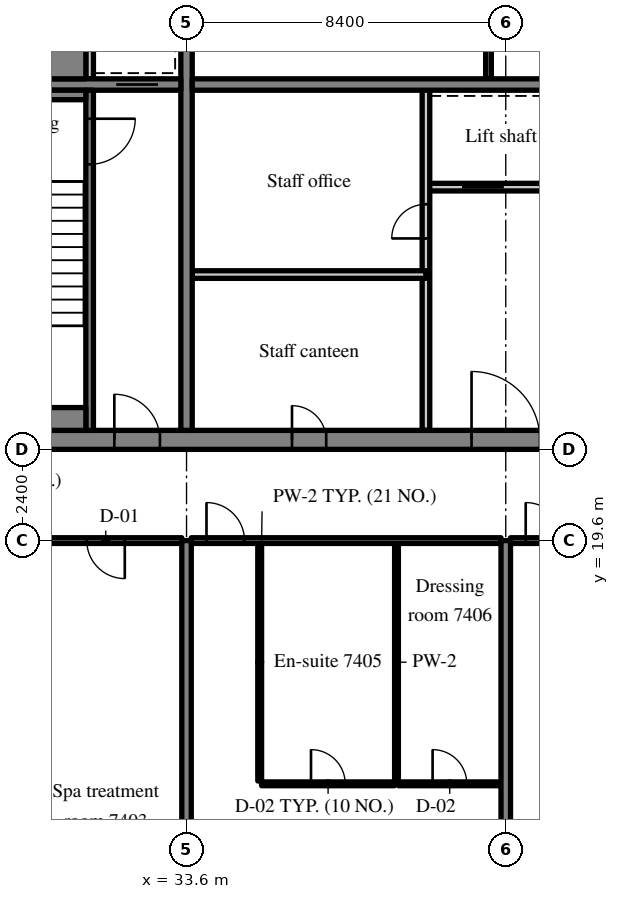
"""IFC4 building model, lengths in metres.
Left out: names, types, materials, properties, quantities, classifications, styles, units other than length and angle.
Written with IfcOpenShell. Run it as: python <this file> out.ifc"""

import sys

from ifc_helpers import new_model, si_unit, direction, frame, frame_2d, origin, place, context, subcontext, project, spatial, rectangle, extrude, source, transform, mapped, element, fill, save


model = new_model("IFC4")
c1 = context("Model", 3, precision=1e-05, world=origin(), true_north=direction((0.0, 1.0)))
c2 = subcontext(c1, "Body", "Model", "MODEL_VIEW")
j1 = project(units=[si_unit("LENGTHUNIT", "METRE"), si_unit("PLANEANGLEUNIT", "RADIAN")], contexts=[c1])
p1 = place(None, origin())
s1 = spatial("IfcSite", under=j1, at=p1, CompositionType="ELEMENT")
p2 = place(p1, origin())
s2 = spatial("IfcBuilding", under=s1, at=p2, CompositionType="ELEMENT")
p3 = place(p2, frame((0.0, 0.0, 309.7)))
s3 = spatial("IfcBuildingStorey", under=s2, at=p3, CompositionType="ELEMENT", Elevation=309.7)
m1 = source(origin(), c2, "Body", "SweptSolid", [
    extrude(rectangle(XDim=50.4, YDim=0.5, at=frame_2d((25.2, 0.0))), origin(), (0.0, 0.0, 1.0), 3.72),
])
p4 = place(p3, frame((25.2, 22.25, 0.0), z_axis=(0.0, 0.0, 1.0), x_axis=(1.0, 0.0, 0.0)))
e1 = element("IfcWall", 1, at=p4, inside=s3, PredefinedType="SHEAR", context=c2, shape_type="MappedRepresentation", body=[
    mapped(m1, transform((0.0, 0.0, 0.0), scale=1.0)),
])
m2 = source(origin(), c2, "Body", "SweptSolid", [
    extrude(rectangle(XDim=1.8, YDim=2.1, at=frame_2d((0.9, 1.05))), frame((0.0, 0.26, 0.0), z_axis=(0.0, -1.0, 0.0), x_axis=(1.0, 0.0, 0.0)), (0.0, 0.0, 1.0), 0.52),
])
p5 = place(p4, frame((15.9, 0.0, 0.0)))
e2 = element("IfcOpeningElement", 2, at=p5, cuts=e1, PredefinedType="OPENING", context=c2, shape_type="MappedRepresentation", body=[
    mapped(m2, transform((0.0, 0.0, 0.0), scale=1.0)),
])
m3 = source(origin(), c2, "Body", "SweptSolid", [
    extrude(rectangle(XDim=0.9, YDim=2.1, at=frame_2d((0.45, 1.05))), frame((0.0, 0.26, 0.0), z_axis=(0.0, -1.0, 0.0), x_axis=(1.0, 0.0, 0.0)), (0.0, 0.0, 1.0), 0.52),
])
p6 = place(p4, frame((11.175, 0.0, 0.0)))
e3 = element("IfcOpeningElement", 3, at=p6, cuts=e1, PredefinedType="OPENING", context=c2, shape_type="MappedRepresentation", body=[
    mapped(m3, transform((0.0, 0.0, 0.0), scale=1.0)),
])
p7 = place(p4, frame((21.525, 0.0, 0.0)))
e4 = element("IfcOpeningElement", 4, at=p7, cuts=e1, PredefinedType="OPENING", context=c2, shape_type="MappedRepresentation", body=[
    mapped(m3, transform((0.0, 0.0, 0.0), scale=1.0)),
])
p8 = place(p4, frame((32.7, 0.0, 0.0)))
e5 = element("IfcOpeningElement", 5, at=p8, cuts=e1, PredefinedType="OPENING", context=c2, shape_type="MappedRepresentation", body=[
    mapped(m2, transform((0.0, 0.0, 0.0), scale=1.0)),
])
m4 = source(origin(), c2, "Body", "SweptSolid", [
    extrude(rectangle(XDim=1.2, YDim=2.1, at=frame_2d((0.6, 1.05))), frame((0.0, 0.26, 0.0), z_axis=(0.0, -1.0, 0.0), x_axis=(1.0, 0.0, 0.0)), (0.0, 0.0, 1.0), 0.52),
])
p9 = place(p4, frame((6.5, 0.0, 0.0)))
e6 = element("IfcOpeningElement", 6, at=p9, cuts=e1, PredefinedType="OPENING", context=c2, shape_type="MappedRepresentation", body=[
    mapped(m4, transform((0.0, 0.0, 0.0), scale=1.0)),
])
p10 = place(p4, frame((47.975, 0.0, 0.0)))
e7 = element("IfcOpeningElement", 7, at=p10, cuts=e1, PredefinedType="OPENING", context=c2, shape_type="MappedRepresentation", body=[
    mapped(m4, transform((0.0, 0.0, 0.0), scale=1.0)),
])
m5 = source(origin(), c2, "Body", "SweptSolid", [
    extrude(rectangle(XDim=19.0, YDim=0.3, at=frame_2d((9.5, 0.0))), origin(), (0.0, 0.0, 1.0), 3.72),
])
p11 = place(p3, frame((33.6, 22.5, 0.0), z_axis=(0.0, 0.0, 1.0), x_axis=(0.0, 1.0, 0.0)))
e8 = element("IfcWall", 8, at=p11, inside=s3, PredefinedType="SHEAR", context=c2, shape_type="MappedRepresentation", body=[
    mapped(m5, transform((0.0, 0.0, 0.0), scale=1.0)),
])
m6 = source(origin(), c2, "Body", "SweptSolid", [
    extrude(rectangle(XDim=1.1, YDim=2.1, at=frame_2d((0.55, 1.05))), frame((0.0, 0.16, 0.0), z_axis=(0.0, -1.0, 0.0), x_axis=(1.0, 0.0, 0.0)), (0.0, 0.0, 1.0), 0.32),
])
p12 = place(p11, frame((12.95, 0.0, 0.0)))
e9 = element("IfcOpeningElement", 9, at=p12, cuts=e8, PredefinedType="OPENING", context=c2, shape_type="MappedRepresentation", body=[
    mapped(m6, transform((0.0, 0.0, 0.0), scale=1.0)),
])
m7 = source(origin(), c2, "Body", "SweptSolid", [
    extrude(rectangle(XDim=7.75, YDim=0.3, at=frame_2d((3.875, 0.0))), origin(), (0.0, 0.0, 1.0), 3.72),
])
p13 = place(p3, frame((25.7, 31.6, 0.0), z_axis=(0.0, 0.0, 1.0), x_axis=(1.0, 0.0, 0.0)))
e10 = element("IfcWall", 10, at=p13, inside=s3, PredefinedType="SHEAR", context=c2, shape_type="MappedRepresentation", body=[
    mapped(m7, transform((0.0, 0.0, 0.0), scale=1.0)),
])
p14 = place(p13, frame((6.05, 0.0, 0.0)))
e11 = element("IfcOpeningElement", 11, at=p14, cuts=e10, PredefinedType="OPENING", context=c2, shape_type="MappedRepresentation", body=[
    mapped(m6, transform((0.0, 0.0, 0.0), scale=1.0)),
])
m8 = source(origin(), c2, "Body", "SweptSolid", [
    extrude(rectangle(XDim=16.5, YDim=0.3, at=frame_2d((8.25, 0.0))), origin(), (0.0, 0.0, 1.0), 3.72),
])
p15 = place(p3, frame((33.75, 31.6, 0.0), z_axis=(0.0, 0.0, 1.0), x_axis=(1.0, 0.0, 0.0)))
e12 = element("IfcWall", 12, at=p15, inside=s3, PredefinedType="SHEAR", context=c2, shape_type="MappedRepresentation", body=[
    mapped(m8, transform((0.0, 0.0, 0.0), scale=1.0)),
])
m9 = source(origin(), c2, "Body", "SweptSolid", [
    extrude(rectangle(XDim=1.0, YDim=2.1, at=frame_2d((0.5, 1.05))), frame((0.0, 0.16, 0.0), z_axis=(0.0, -1.0, 0.0), x_axis=(1.0, 0.0, 0.0)), (0.0, 0.0, 1.0), 0.32),
])
p16 = place(p15, frame((14.875, 0.0, 0.0)))
e13 = element("IfcOpeningElement", 13, at=p16, cuts=e12, PredefinedType="OPENING", context=c2, shape_type="MappedRepresentation", body=[
    mapped(m9, transform((0.0, 0.0, 0.0), scale=1.0)),
])
m10 = source(origin(), c2, "Body", "SweptSolid", [
    extrude(rectangle(XDim=14.1, YDim=0.25, at=frame_2d((7.05, 0.0))), origin(), (0.0, 0.0, 1.0), 3.72),
])
for number, where, z_axis, x_axis in (
    (14, (33.6, 5.5, 0.0), (0.0, 0.0, 1.0), (0.0, 1.0, 0.0)),
    (15, (42.0, 5.5, 0.0), (0.0, 0.0, 1.0), (0.0, 1.0, 0.0)),
):
    element("IfcWall", number, at=place(p3, frame(where, z_axis=z_axis, x_axis=x_axis)), inside=s3, PredefinedType="SHEAR", context=c2, shape_type="MappedRepresentation", body=[
        mapped(m10, transform((0.0, 0.0, 0.0), scale=1.0)),
    ])
m11 = source(origin(), c2, "Body", "SweptSolid", [
    extrude(rectangle(XDim=6.0, YDim=0.2, at=frame_2d((3.0, 0.0))), origin(), (0.0, 0.0, 1.0), 3.72),
])
p17 = place(p3, frame((39.9, 28.9, 0.0), z_axis=(0.0, 0.0, 1.0), x_axis=(1.0, 0.0, 0.0)))
e16 = element("IfcWall", 16, at=p17, inside=s3, PredefinedType="SOLIDWALL", context=c2, shape_type="MappedRepresentation", body=[
    mapped(m11, transform((0.0, 0.0, 0.0), scale=1.0)),
])
m12 = source(origin(), c2, "Body", "SweptSolid", [
    extrude(rectangle(XDim=1.1, YDim=2.1, at=frame_2d((0.55, 1.05))), frame((0.0, 0.11, 0.0), z_axis=(0.0, -1.0, 0.0), x_axis=(1.0, 0.0, 0.0)), (0.0, 0.0, 1.0), 0.22),
])
p18 = place(p17, frame((0.95, 0.0, 0.0)))
e17 = element("IfcOpeningElement", 17, at=p18, cuts=e16, PredefinedType="OPENING", context=c2, shape_type="MappedRepresentation", body=[
    mapped(m12, transform((0.0, 0.0, 0.0), scale=1.0)),
])
p19 = place(p17, frame((3.95, 0.0, 0.0)))
e18 = element("IfcOpeningElement", 18, at=p19, cuts=e16, PredefinedType="OPENING", context=c2, shape_type="MappedRepresentation", body=[
    mapped(m12, transform((0.0, 0.0, 0.0), scale=1.0)),
])
m13 = source(origin(), c2, "Body", "SweptSolid", [
    extrude(rectangle(XDim=8.95, YDim=0.2, at=frame_2d((4.475, 0.0))), origin(), (0.0, 0.0, 1.0), 3.72),
])
p20 = place(p3, frame((39.9, 22.5, 0.0), z_axis=(0.0, 0.0, 1.0), x_axis=(0.0, 1.0, 0.0)))
e19 = element("IfcWall", 19, at=p20, inside=s3, PredefinedType="PARTITIONING", context=c2, shape_type="MappedRepresentation", body=[
    mapped(m13, transform((0.0, 0.0, 0.0), scale=1.0)),
])
m14 = source(origin(), c2, "Body", "SweptSolid", [
    extrude(rectangle(XDim=0.9, YDim=2.1, at=frame_2d((0.45, 1.05))), frame((0.0, 0.11, 0.0), z_axis=(0.0, -1.0, 0.0), x_axis=(1.0, 0.0, 0.0)), (0.0, 0.0, 1.0), 0.22),
])
p21 = place(p20, frame((5.05, 0.0, 0.0)))
e20 = element("IfcOpeningElement", 20, at=p21, cuts=e19, PredefinedType="OPENING", context=c2, shape_type="MappedRepresentation", body=[
    mapped(m14, transform((0.0, 0.0, 0.0), scale=1.0)),
])
m15 = source(origin(), c2, "Body", "SweptSolid", [
    extrude(rectangle(XDim=6.15, YDim=0.2, at=frame_2d((3.075, 0.0))), origin(), (0.0, 0.0, 1.0), 3.72),
])
p22 = place(p3, frame((33.75, 26.6, 0.0), z_axis=(0.0, 0.0, 1.0), x_axis=(1.0, 0.0, 0.0)))
e21 = element("IfcWall", 21, at=p22, inside=s3, PredefinedType="PARTITIONING", context=c2, shape_type="MappedRepresentation", body=[
    mapped(m15, transform((0.0, 0.0, 0.0), scale=1.0)),
])
m16 = source(origin(), c2, "Body", "SweptSolid", [
    extrude(rectangle(XDim=3.25, YDim=0.15, at=frame_2d((1.625, 0.0))), origin(), (0.0, 0.0, 1.0), 3.72),
])
p23 = place(p3, frame((41.546, 31.75, 0.0), z_axis=(0.0, 0.0, 1.0), x_axis=(0.0, 1.0, 0.0)))
e22 = element("IfcWall", 22, at=p23, inside=s3, PredefinedType="PARTITIONING", context=c2, shape_type="MappedRepresentation", body=[
    mapped(m16, transform((0.0, 0.0, 0.0), scale=1.0)),
])
m17 = source(origin(), c2, "Body", "SweptSolid", [
    extrude(rectangle(XDim=8.95, YDim=0.2, at=frame_2d((4.475, 0.0))), origin(), (0.0, 0.0, 1.0), 3.72),
])
p24 = place(p3, frame((31.05, 22.5, 0.0), z_axis=(0.0, 0.0, 1.0), x_axis=(0.0, 1.0, 0.0)))
e23 = element("IfcWall", 23, at=p24, inside=s3, PredefinedType="SOLIDWALL", context=c2, shape_type="MappedRepresentation", body=[
    mapped(m17, transform((0.0, 0.0, 0.0), scale=1.0)),
])
m18 = source(origin(), c2, "Body", "SweptSolid", [
    extrude(rectangle(XDim=1.2, YDim=2.1, at=frame_2d((0.6, 1.05))), frame((0.0, 0.11, 0.0), z_axis=(0.0, -1.0, 0.0), x_axis=(1.0, 0.0, 0.0)), (0.0, 0.0, 1.0), 0.22),
])
p25 = place(p24, frame((7.0, 0.0, 0.0)))
e24 = element("IfcOpeningElement", 24, at=p25, cuts=e23, PredefinedType="OPENING", context=c2, shape_type="MappedRepresentation", body=[
    mapped(m18, transform((0.0, 0.0, 0.0), scale=1.0)),
])
m19 = source(origin(), c2, "Body", "SweptSolid", [
    extrude(rectangle(XDim=1.85, YDim=0.2, at=frame_2d((0.925, 0.0))), origin(), (0.0, 0.0, 1.0), 3.72),
])
p26 = place(p3, frame((31.05, 31.75, 0.0), z_axis=(0.0, 0.0, 1.0), x_axis=(0.0, 1.0, 0.0)))
e25 = element("IfcWall", 25, at=p26, inside=s3, PredefinedType="SOLIDWALL", context=c2, shape_type="MappedRepresentation", body=[
    mapped(m19, transform((0.0, 0.0, 0.0), scale=1.0)),
])
m20 = source(origin(), c2, "Body", "SweptSolid", [
    extrude(rectangle(XDim=5.25, YDim=0.6, at=frame_2d((2.625, 0.0))), origin(), (0.0, 0.0, 1.0), 3.72),
])
p27 = place(p3, frame((25.7, 22.8, 0.0), z_axis=(0.0, 0.0, 1.0), x_axis=(1.0, 0.0, 0.0)))
e26 = element("IfcWall", 26, at=p27, inside=s3, PredefinedType="SOLIDWALL", context=c2, shape_type="MappedRepresentation", body=[
    mapped(m20, transform((0.0, 0.0, 0.0), scale=1.0)),
])
m21 = source(origin(), c2, "Body", "SweptSolid", [
    extrude(rectangle(XDim=5.25, YDim=0.25, at=frame_2d((2.625, 0.0))), origin(), (0.0, 0.0, 1.0), 3.72),
])
p28 = place(p3, frame((25.7, 31.325, 0.0), z_axis=(0.0, 0.0, 1.0), x_axis=(1.0, 0.0, 0.0)))
e27 = element("IfcWall", 27, at=p28, inside=s3, PredefinedType="SOLIDWALL", context=c2, shape_type="MappedRepresentation", body=[
    mapped(m21, transform((0.0, 0.0, 0.0), scale=1.0)),
])
m22 = source(origin(), c2, "Body", "SweptSolid", [
    extrude(rectangle(XDim=5.25, YDim=1.05, at=frame_2d((2.625, 0.0))), origin(), (0.0, 0.0, 1.0), 3.72),
])
p29 = place(p3, frame((25.7, 32.275, 0.0), z_axis=(0.0, 0.0, 1.0), x_axis=(1.0, 0.0, 0.0)))
e28 = element("IfcWall", 28, at=p29, inside=s3, PredefinedType="SOLIDWALL", context=c2, shape_type="MappedRepresentation", body=[
    mapped(m22, transform((0.0, 0.0, 0.0), scale=1.0)),
])
m23 = source(origin(), c2, "Body", "SweptSolid", [
    extrude(rectangle(XDim=4.0, YDim=0.15, at=frame_2d((2.0, 0.0))), origin(), (0.0, 0.0, 1.0), 3.02),
])
p30 = place(p3, frame((29.475, 19.6, 0.0), z_axis=(0.0, 0.0, 1.0), x_axis=(1.0, 0.0, 0.0)))
e29 = element("IfcWall", 29, at=p30, inside=s3, PredefinedType="PARTITIONING", context=c2, shape_type="MappedRepresentation", body=[
    mapped(m23, transform((0.0, 0.0, 0.0), scale=1.0)),
])
m24 = source(origin(), c2, "Body", "SweptSolid", [
    extrude(rectangle(XDim=1.0, YDim=2.1, at=frame_2d((0.5, 1.05))), frame((0.0, 0.085, 0.0), z_axis=(0.0, -1.0, 0.0), x_axis=(1.0, 0.0, 0.0)), (0.0, 0.0, 1.0), 0.17),
])
p31 = place(p30, frame((1.5, 0.0, 0.0)))
e30 = element("IfcOpeningElement", 30, at=p31, cuts=e29, PredefinedType="OPENING", context=c2, shape_type="MappedRepresentation", body=[
    mapped(m24, transform((0.0, 0.0, 0.0), scale=1.0)),
])
m25 = source(origin(), c2, "Body", "SweptSolid", [
    extrude(rectangle(XDim=6.25, YDim=0.1, at=frame_2d((3.125, 0.0))), origin(), (0.0, 0.0, 1.0), 3.72),
])
for number, where, z_axis, x_axis in (
    (31, (35.525, 13.275, 0.0), (0.0, 0.0, 1.0), (0.0, 1.0, 0.0)),
    (32, (39.125, 13.275, 0.0), (0.0, 0.0, 1.0), (0.0, 1.0, 0.0)),
):
    element("IfcWall", number, at=place(p3, frame(where, z_axis=z_axis, x_axis=x_axis)), inside=s3, PredefinedType="PARTITIONING", context=c2, shape_type="MappedRepresentation", body=[
        mapped(m25, transform((0.0, 0.0, 0.0), scale=1.0)),
    ])
m26 = source(origin(), c2, "Body", "SweptSolid", [
    extrude(rectangle(XDim=3.5, YDim=0.1, at=frame_2d((1.75, 0.0))), origin(), (0.0, 0.0, 1.0), 3.72),
])
p32 = place(p3, frame((35.575, 13.2, 0.0), z_axis=(0.0, 0.0, 1.0), x_axis=(1.0, 0.0, 0.0)))
e33 = element("IfcWall", 33, at=p32, inside=s3, PredefinedType="PARTITIONING", context=c2, shape_type="MappedRepresentation", body=[
    mapped(m26, transform((0.0, 0.0, 0.0), scale=1.0)),
])
m27 = source(origin(), c2, "Body", "SweptSolid", [
    extrude(rectangle(XDim=0.9, YDim=2.1, at=frame_2d((0.45, 1.05))), frame((0.0, 0.06, 0.0), z_axis=(0.0, -1.0, 0.0), x_axis=(1.0, 0.0, 0.0)), (0.0, 0.0, 1.0), 0.12),
])
p33 = place(p32, frame((1.3, 0.0, 0.0)))
e34 = element("IfcOpeningElement", 34, at=p33, cuts=e33, PredefinedType="OPENING", context=c2, shape_type="MappedRepresentation", body=[
    mapped(m27, transform((0.0, 0.0, 0.0), scale=1.0)),
])
m28 = source(origin(), c2, "Body", "SweptSolid", [
    extrude(rectangle(XDim=2.7, YDim=0.1, at=frame_2d((1.35, 0.0))), origin(), (0.0, 0.0, 1.0), 3.72),
])
p34 = place(p3, frame((39.175, 13.2, 0.0), z_axis=(0.0, 0.0, 1.0), x_axis=(1.0, 0.0, 0.0)))
e35 = element("IfcWall", 35, at=p34, inside=s3, PredefinedType="PARTITIONING", context=c2, shape_type="MappedRepresentation", body=[
    mapped(m28, transform((0.0, 0.0, 0.0), scale=1.0)),
])
p35 = place(p34, frame((0.9, 0.0, 0.0)))
e36 = element("IfcOpeningElement", 36, at=p35, cuts=e35, PredefinedType="OPENING", context=c2, shape_type="MappedRepresentation", body=[
    mapped(m27, transform((0.0, 0.0, 0.0), scale=1.0)),
])
m29 = source(origin(), c2, "Body", "SweptSolid", [
    extrude(rectangle(XDim=8.15, YDim=0.15, at=frame_2d((4.075, 0.0))), origin(), (0.0, 0.0, 1.0), 3.02),
])
p36 = place(p3, frame((33.725, 19.6, 0.0), z_axis=(0.0, 0.0, 1.0), x_axis=(1.0, 0.0, 0.0)))
e37 = element("IfcWall", 37, at=p36, inside=s3, PredefinedType="PARTITIONING", context=c2, shape_type="MappedRepresentation", body=[
    mapped(m29, transform((0.0, 0.0, 0.0), scale=1.0)),
])
p37 = place(p36, frame((0.4, 0.0, 0.0)))
e38 = element("IfcOpeningElement", 38, at=p37, cuts=e37, PredefinedType="OPENING", context=c2, shape_type="MappedRepresentation", body=[
    mapped(m24, transform((0.0, 0.0, 0.0), scale=1.0)),
])
p38 = place(p3, frame((42.125, 19.6, 0.0), z_axis=(0.0, 0.0, 1.0), x_axis=(1.0, 0.0, 0.0)))
e39 = element("IfcWall", 39, at=p38, inside=s3, PredefinedType="PARTITIONING", context=c2, shape_type="MappedRepresentation", body=[
    mapped(m29, transform((0.0, 0.0, 0.0), scale=1.0)),
])
p39 = place(p38, frame((0.4, 0.0, 0.0)))
e40 = element("IfcOpeningElement", 40, at=p39, cuts=e39, PredefinedType="OPENING", context=c2, shape_type="MappedRepresentation", body=[
    mapped(m24, transform((0.0, 0.0, 0.0), scale=1.0)),
])
m30 = source(origin(), c2, "Body", "SweptSolid", [
    extrude(rectangle(XDim=1.8, YDim=2.1, at=frame_2d((0.9, 1.05))), frame((0.0, 0.175, 0.0), z_axis=(0.0, -1.0, 0.0), x_axis=(1.0, 0.0, 0.0)), (0.0, 0.0, 1.0), 0.05),
])
p40 = place(p5, origin())
e41 = element("IfcDoor", 41, at=p40, inside=s3, OperationType="DOUBLE_DOOR_SINGLE_SWING", PredefinedType="DOOR", context=c2, shape_type="MappedRepresentation", body=[
    mapped(m30, transform((0.0, 0.0, 0.0), scale=1.0)),
])
fill(e2, e41)
m31 = source(origin(), c2, "Body", "SweptSolid", [
    extrude(rectangle(XDim=1.1, YDim=2.1, at=frame_2d((0.55, 1.05))), frame((0.0, 0.025, 0.0), z_axis=(0.0, -1.0, 0.0), x_axis=(1.0, 0.0, 0.0)), (0.0, 0.0, 1.0), 0.05),
])
p41 = place(p18, origin())
e42 = element("IfcDoor", 42, at=p41, inside=s3, OperationType="SLIDING_TO_LEFT", PredefinedType="DOOR", context=c2, shape_type="MappedRepresentation", body=[
    mapped(m31, transform((0.0, 0.0, 0.0), scale=1.0)),
])
fill(e17, e42)
m32 = source(origin(), c2, "Body", "SweptSolid", [
    extrude(rectangle(XDim=0.9, YDim=2.1, at=frame_2d((0.45, 1.05))), frame((0.0, 0.175, 0.0), z_axis=(0.0, -1.0, 0.0), x_axis=(1.0, 0.0, 0.0)), (0.0, 0.0, 1.0), 0.05),
])
p42 = place(p6, origin())
e43 = element("IfcDoor", 43, at=p42, inside=s3, OperationType="SINGLE_SWING_LEFT", PredefinedType="DOOR", context=c2, shape_type="MappedRepresentation", body=[
    mapped(m32, transform((0.0, 0.0, 0.0), scale=1.0)),
])
fill(e3, e43)
m33 = source(origin(), c2, "Body", "SweptSolid", [
    extrude(rectangle(XDim=0.9, YDim=2.1, at=frame_2d((0.45, 1.05))), frame((0.0, 0.025, 0.0), z_axis=(0.0, -1.0, 0.0), x_axis=(1.0, 0.0, 0.0)), (0.0, 0.0, 1.0), 0.05),
])
p43 = place(p21, origin())
e44 = element("IfcDoor", 44, at=p43, inside=s3, OperationType="SINGLE_SWING_LEFT", PredefinedType="DOOR", context=c2, shape_type="MappedRepresentation", body=[
    mapped(m33, transform((0.0, 0.0, 0.0), scale=1.0)),
])
fill(e20, e44)
m34 = source(origin(), c2, "Body", "SweptSolid", [
    extrude(rectangle(XDim=1.2, YDim=2.1, at=frame_2d((0.6, 1.05))), frame((0.0, 0.025, 0.0), z_axis=(0.0, -1.0, 0.0), x_axis=(1.0, 0.0, 0.0)), (0.0, 0.0, 1.0), 0.05),
])
p44 = place(p25, origin())
e45 = element("IfcDoor", 45, at=p44, inside=s3, OperationType="SINGLE_SWING_RIGHT", PredefinedType="DOOR", context=c2, shape_type="MappedRepresentation", body=[
    mapped(m34, transform((0.0, 0.0, 0.0), scale=1.0)),
])
fill(e24, e45)
m35 = source(origin(), c2, "Body", "SweptSolid", [
    extrude(rectangle(XDim=1.2, YDim=2.1, at=frame_2d((0.6, 1.05))), frame((0.0, 0.175, 0.0), z_axis=(0.0, -1.0, 0.0), x_axis=(1.0, 0.0, 0.0)), (0.0, 0.0, 1.0), 0.05),
])
p45 = place(p9, origin())
e46 = element("IfcDoor", 46, at=p45, inside=s3, OperationType="SINGLE_SWING_LEFT", PredefinedType="DOOR", context=c2, shape_type="MappedRepresentation", body=[
    mapped(m35, transform((0.0, 0.0, 0.0), scale=1.0)),
])
fill(e6, e46)
p46 = place(p14, origin())
e47 = element("IfcDoor", 47, at=p46, inside=s3, OperationType="SLIDING_TO_LEFT", PredefinedType="DOOR", context=c2, shape_type="MappedRepresentation", body=[
    mapped(m31, transform((0.0, 0.0, 0.0), scale=1.0)),
])
fill(e11, e47)
m36 = source(origin(), c2, "Body", "SweptSolid", [
    extrude(rectangle(XDim=1.0, YDim=2.1, at=frame_2d((0.5, 1.05))), frame((0.0, 0.025, 0.0), z_axis=(0.0, -1.0, 0.0), x_axis=(1.0, 0.0, 0.0)), (0.0, 0.0, 1.0), 0.05),
])
p47 = place(p31, origin())
e48 = element("IfcDoor", 48, at=p47, inside=s3, OperationType="SINGLE_SWING_RIGHT", PredefinedType="DOOR", context=c2, shape_type="MappedRepresentation", body=[
    mapped(m36, transform((0.0, 0.0, 0.0), scale=1.0)),
])
fill(e30, e48)
p48 = place(p33, origin())
e49 = element("IfcDoor", 49, at=p48, inside=s3, OperationType="SINGLE_SWING_LEFT", PredefinedType="DOOR", context=c2, shape_type="MappedRepresentation", body=[
    mapped(m33, transform((0.0, 0.0, 0.0), scale=1.0)),
])
fill(e34, e49)
p49 = place(p35, origin())
e50 = element("IfcDoor", 50, at=p49, inside=s3, OperationType="SINGLE_SWING_LEFT", PredefinedType="DOOR", context=c2, shape_type="MappedRepresentation", body=[
    mapped(m33, transform((0.0, 0.0, 0.0), scale=1.0)),
])
fill(e36, e50)
p50 = place(p37, origin())
e51 = element("IfcDoor", 51, at=p50, inside=s3, OperationType="SINGLE_SWING_LEFT", PredefinedType="DOOR", context=c2, shape_type="MappedRepresentation", body=[
    mapped(m36, transform((0.0, 0.0, 0.0), scale=1.0)),
])
fill(e38, e51)
p51 = place(p39, origin())
e52 = element("IfcDoor", 52, at=p51, inside=s3, OperationType="SINGLE_SWING_LEFT", PredefinedType="DOOR", context=c2, shape_type="MappedRepresentation", body=[
    mapped(m36, transform((0.0, 0.0, 0.0), scale=1.0)),
])
fill(e40, e52)
save(model, sys.argv[1])
